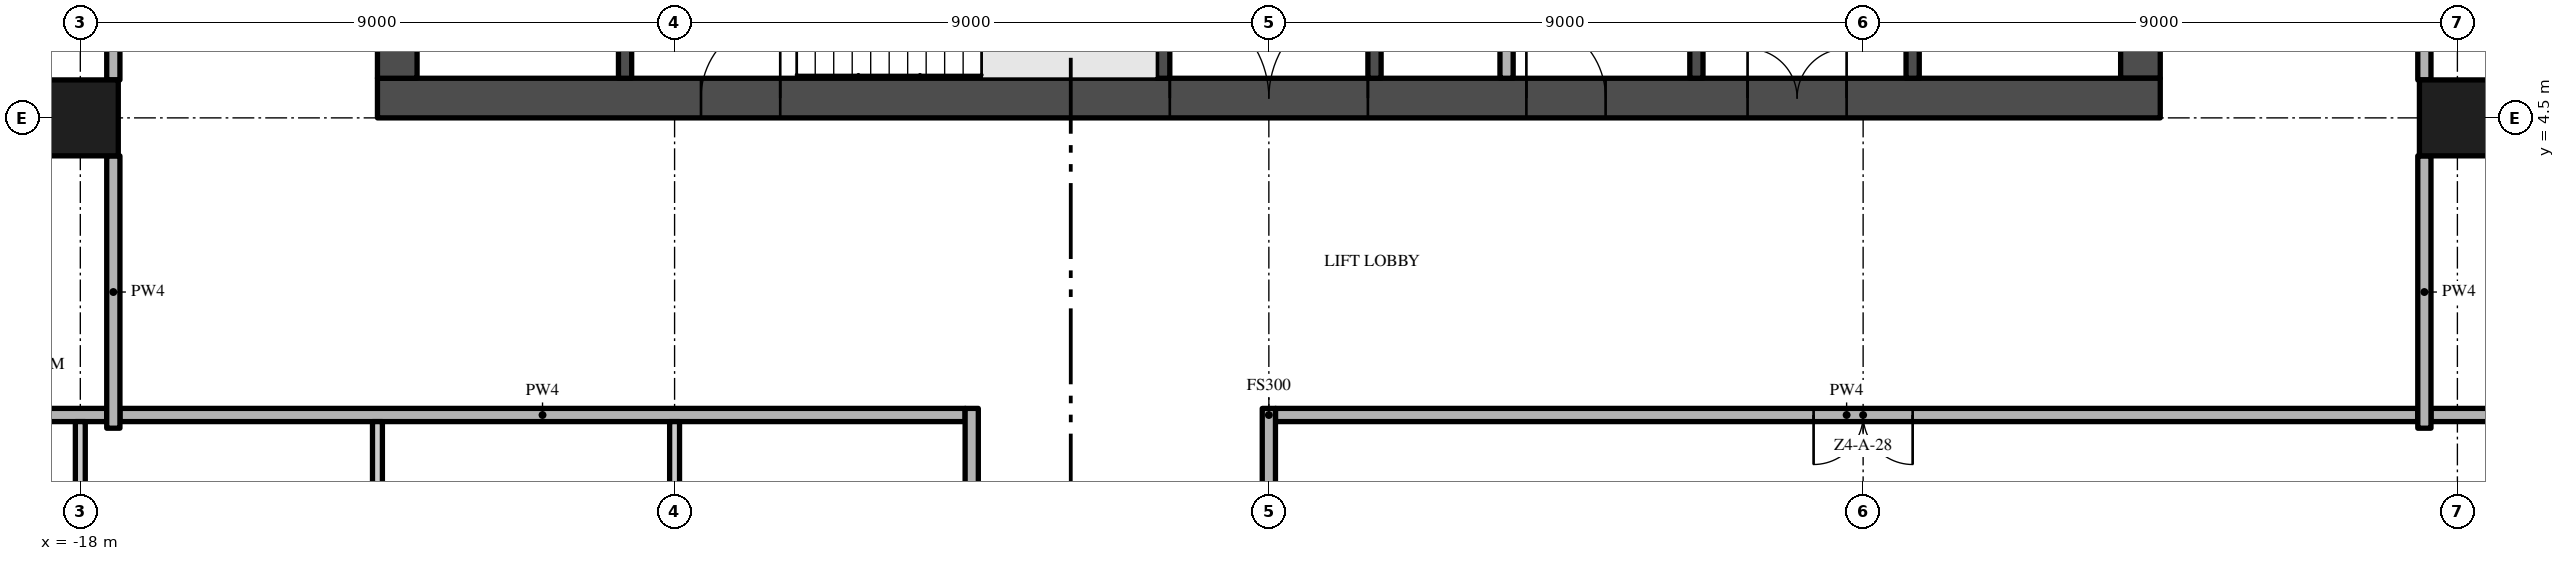
"""IFC4 building model, lengths in metres.
Left out: names, types, materials, properties, quantities, classifications, styles, units other than length and angle.
Written with IfcOpenShell. Run it as: python <this file> out.ifc"""

import sys

from ifc_helpers import new_model, si_unit, direction, frame, frame_2d, origin, origin_2d, place, context, subcontext, project, spatial, rectangle, extrude, element, fill, save


model = new_model("IFC4")
c1 = context("Model", 3, precision=1e-05, world=origin(), true_north=direction((0.0, 1.0)))
c2 = subcontext(c1, "Body", "Model", "MODEL_VIEW")
j1 = project(units=[si_unit("LENGTHUNIT", "METRE"), si_unit("PLANEANGLEUNIT", "RADIAN")], contexts=[c1])
p1 = place(None, origin())
s1 = spatial("IfcSite", under=j1, at=p1, CompositionType="ELEMENT")
p2 = place(p1, origin())
s2 = spatial("IfcBuilding", under=s1, at=p2, CompositionType="ELEMENT")
p3 = place(p2, frame((0.0, 0.0, 188.2)))
s3 = spatial("IfcBuildingStorey", under=s2, at=p3, CompositionType="ELEMENT", Elevation=188.2)
p4 = place(p3, frame((-13.5, 4.8, -0.3), z_axis=(0.0, 0.0, 1.0), x_axis=(1.0, 0.0, 0.0)))
e1 = element("IfcWall", 1, at=p4, inside=s3, PredefinedType="SHEAR", context=c2, shape_type="SweptSolid", body=[
    extrude(rectangle(XDim=27.0, YDim=0.6, at=frame_2d((13.5, 0.0))), origin(), (0.0, 0.0, 1.0), 3.8),
])
p5 = place(p4, frame((12.0, 0.0, 0.3)))
e2 = element("IfcOpeningElement", 2, at=p5, cuts=e1, PredefinedType="OPENING", context=c2, shape_type="SweptSolid", body=[
    extrude(rectangle(XDim=3.0, YDim=2.4, at=frame_2d((1.5, 1.2))), frame((0.0, 0.31, 0.0), z_axis=(0.0, -1.0, 0.0), x_axis=(1.0, 0.0, 0.0)), (0.0, 0.0, 1.0), 0.62),
])
p6 = place(p4, frame((4.9, 0.0, 0.3)))
e3 = element("IfcOpeningElement", 3, at=p6, cuts=e1, PredefinedType="OPENING", context=c2, shape_type="SweptSolid", body=[
    extrude(rectangle(XDim=1.2, YDim=2.2, at=frame_2d((0.6, 1.1))), frame((0.0, 0.31, 0.0), z_axis=(0.0, -1.0, 0.0), x_axis=(1.0, 0.0, 0.0)), (0.0, 0.0, 1.0), 0.62),
])
p7 = place(p4, frame((20.75, 0.0, 0.3)))
e4 = element("IfcOpeningElement", 4, at=p7, cuts=e1, PredefinedType="OPENING", context=c2, shape_type="SweptSolid", body=[
    extrude(rectangle(XDim=1.5, YDim=2.2, at=frame_2d((0.75, 1.1))), frame((0.0, 0.31, 0.0), z_axis=(0.0, -1.0, 0.0), x_axis=(1.0, 0.0, 0.0)), (0.0, 0.0, 1.0), 0.62),
])
p8 = place(p4, frame((17.4, 0.0, 0.3)))
e5 = element("IfcOpeningElement", 5, at=p8, cuts=e1, PredefinedType="OPENING", context=c2, shape_type="SweptSolid", body=[
    extrude(rectangle(XDim=1.2, YDim=2.2, at=frame_2d((0.6, 1.1))), frame((0.0, 0.31, 0.0), z_axis=(0.0, -1.0, 0.0), x_axis=(1.0, 0.0, 0.0)), (0.0, 0.0, 1.0), 0.62),
])
p9 = place(p3, frame((13.2, 5.1, -0.3), z_axis=(0.0, 0.0, 1.0), x_axis=(0.0, 1.0, 0.0)))
e6 = element("IfcWall", 6, at=p9, inside=s3, PredefinedType="SHEAR", context=c2, shape_type="SweptSolid", body=[
    extrude(rectangle(XDim=16.8, YDim=0.6, at=frame_2d((8.4, 0.0))), origin(), (0.0, 0.0, 1.0), 3.8),
])
p10 = place(p9, frame((6.3, 0.0, 0.3)))
e7 = element("IfcOpeningElement", 7, at=p10, cuts=e6, PredefinedType="OPENING", context=c2, shape_type="SweptSolid", body=[
    extrude(rectangle(XDim=1.2, YDim=2.2, at=frame_2d((0.6, 1.1))), frame((0.0, 0.31, 0.0), z_axis=(0.0, -1.0, 0.0), x_axis=(1.0, 0.0, 0.0)), (0.0, 0.0, 1.0), 0.62),
])
p11 = place(p3, frame((-13.2, 21.9, -0.3), z_axis=(0.0, 0.0, 1.0), x_axis=(0.0, -1.0, 0.0)))
e8 = element("IfcWall", 8, at=p11, inside=s3, PredefinedType="SHEAR", context=c2, shape_type="SweptSolid", body=[
    extrude(rectangle(XDim=16.8, YDim=0.6, at=frame_2d((8.4, 0.0))), origin(), (0.0, 0.0, 1.0), 3.8),
])
p12 = place(p11, frame((9.3, 0.0, 0.3)))
e9 = element("IfcOpeningElement", 9, at=p12, cuts=e8, PredefinedType="OPENING", context=c2, shape_type="SweptSolid", body=[
    extrude(rectangle(XDim=1.2, YDim=2.2, at=frame_2d((0.6, 1.1))), frame((0.0, 0.31, 0.0), z_axis=(0.0, -1.0, 0.0), x_axis=(1.0, 0.0, 0.0)), (0.0, 0.0, 1.0), 0.62),
])
for number, where, z_axis, x_axis in (
    (10, (-18.0, 4.5, 0.0), (0.0, 0.0, 1.0), (1.0, 0.0, 0.0)),
    (11, (18.0, 4.5, 0.0), (0.0, 0.0, 1.0), (1.0, 0.0, 0.0)),
):
    element("IfcColumn", number, at=place(p3, frame(where, z_axis=z_axis, x_axis=x_axis)), inside=s3, PredefinedType="COLUMN", context=c2, shape_type="SweptSolid", body=[
        extrude(rectangle(XDim=1.15, YDim=1.15, at=origin_2d()), origin(), (0.0, 0.0, 1.0), 3.5),
    ])
for number, where, z_axis, x_axis in (
    (12, (-9.75, 5.1, 0.0), (0.0, 0.0, 1.0), (0.0, 1.0, 0.0)),
    (13, (-1.6, 5.1, 0.0), (0.0, 0.0, 1.0), (0.0, 1.0, 0.0)),
):
    element("IfcWall", number, at=place(p3, frame(where, z_axis=z_axis, x_axis=x_axis)), inside=s3, PredefinedType="SHEAR", context=c2, shape_type="SweptSolid", body=[
        extrude(rectangle(XDim=2.85, YDim=0.2, at=frame_2d((1.425, 0.0))), origin(), (0.0, 0.0, 1.0), 3.5),
    ])
p13 = place(p3, frame((1.6, 13.5, 0.0), z_axis=(0.0, 0.0, 1.0), x_axis=(0.0, -1.0, 0.0)))
e14 = element("IfcWall", 14, at=p13, inside=s3, PredefinedType="SHEAR", context=c2, shape_type="SweptSolid", body=[
    extrude(rectangle(XDim=8.4, YDim=0.2, at=frame_2d((4.2, 0.0))), origin(), (0.0, 0.0, 1.0), 3.5),
])
p14 = place(p13, frame((3.35, 0.0, 0.0)))
e15 = element("IfcOpeningElement", 15, at=p14, cuts=e14, PredefinedType="OPENING", context=c2, shape_type="SweptSolid", body=[
    extrude(rectangle(XDim=0.9, YDim=2.1, at=frame_2d((0.45, 1.05))), frame((0.0, 0.11, 0.0), z_axis=(0.0, -1.0, 0.0), x_axis=(1.0, 0.0, 0.0)), (0.0, 0.0, 1.0), 0.22),
])
p15 = place(p3, frame((3.6, 13.5, 0.0), z_axis=(0.0, 0.0, 1.0), x_axis=(0.0, -1.0, 0.0)))
e16 = element("IfcWall", 16, at=p15, inside=s3, PredefinedType="PARTITIONING", context=c2, shape_type="SweptSolid", body=[
    extrude(rectangle(XDim=8.4, YDim=0.2, at=frame_2d((4.2, 0.0))), origin(), (0.0, 0.0, 1.0), 3.5),
])
p16 = place(p15, frame((3.75, 0.0, 0.0)))
e17 = element("IfcOpeningElement", 17, at=p16, cuts=e16, PredefinedType="OPENING", context=c2, shape_type="SweptSolid", body=[
    extrude(rectangle(XDim=0.9, YDim=2.1, at=frame_2d((0.45, 1.05))), frame((0.0, 0.11, 0.0), z_axis=(0.0, -1.0, 0.0), x_axis=(1.0, 0.0, 0.0)), (0.0, 0.0, 1.0), 0.22),
])
p17 = place(p3, frame((6.475, 5.1, 0.0), z_axis=(0.0, 0.0, 1.0), x_axis=(0.0, 1.0, 0.0)))
e18 = element("IfcWall", 18, at=p17, inside=s3, PredefinedType="SHEAR", context=c2, shape_type="SweptSolid", body=[
    extrude(rectangle(XDim=7.0, YDim=0.2, at=frame_2d((3.5, 0.0))), origin(), (0.0, 0.0, 1.0), 3.5),
])
p18 = place(p3, frame((9.75, 5.1, 0.0), z_axis=(0.0, 0.0, 1.0), x_axis=(0.0, 1.0, 0.0)))
e19 = element("IfcWall", 19, at=p18, inside=s3, PredefinedType="SHEAR", context=c2, shape_type="SweptSolid", body=[
    extrude(rectangle(XDim=2.5, YDim=0.2, at=frame_2d((1.25, 0.0))), origin(), (0.0, 0.0, 1.0), 3.5),
])
p19 = place(p18, frame((0.85, 0.0, 0.0)))
e20 = element("IfcOpeningElement", 20, at=p19, cuts=e19, PredefinedType="OPENING", context=c2, shape_type="SweptSolid", body=[
    extrude(rectangle(XDim=1.1, YDim=2.1, at=frame_2d((0.55, 1.05))), frame((0.0, 0.11, 0.0), z_axis=(0.0, -1.0, 0.0), x_axis=(1.0, 0.0, 0.0)), (0.0, 0.0, 1.0), 0.22),
])
p20 = place(p3, frame((-17.4, 0.0, 0.0), z_axis=(0.0, 0.0, 1.0), x_axis=(1.0, 0.0, 0.0)))
e21 = element("IfcWall", 21, at=p20, inside=s3, PredefinedType="PARTITIONING", context=c2, shape_type="SweptSolid", body=[
    extrude(rectangle(XDim=12.8, YDim=0.2, at=frame_2d((6.4, 0.0))), origin(), (0.0, 0.0, 1.0), 3.5),
])
p21 = place(p3, frame((17.4, 0.0, 0.0), z_axis=(0.0, 0.0, 1.0), x_axis=(-1.0, 0.0, 0.0)))
e22 = element("IfcWall", 22, at=p21, inside=s3, PredefinedType="PARTITIONING", context=c2, shape_type="SweptSolid", body=[
    extrude(rectangle(XDim=17.3, YDim=0.2, at=frame_2d((8.65, 0.0))), origin(), (0.0, 0.0, 1.0), 3.5),
])
p22 = place(p21, frame((7.65, 0.0, 0.0)))
e23 = element("IfcOpeningElement", 23, at=p22, cuts=e22, PredefinedType="OPENING", context=c2, shape_type="SweptSolid", body=[
    extrude(rectangle(XDim=1.5, YDim=2.4, at=frame_2d((0.75, 1.2))), frame((0.0, 0.11, 0.0), z_axis=(0.0, -1.0, 0.0), x_axis=(1.0, 0.0, 0.0)), (0.0, 0.0, 1.0), 0.22),
])
for number, where, z_axis, x_axis in (
    (24, (-26.7, 0.0, 0.0), (0.0, 0.0, 1.0), (1.0, 0.0, 0.0)),
    (25, (17.6, 0.0, 0.0), (0.0, 0.0, 1.0), (1.0, 0.0, 0.0)),
):
    element("IfcWall", number, at=place(p3, frame(where, z_axis=z_axis, x_axis=x_axis)), inside=s3, PredefinedType="PARTITIONING", context=c2, shape_type="SweptSolid", body=[
        extrude(rectangle(XDim=9.1, YDim=0.2, at=frame_2d((4.55, 0.0))), origin(), (0.0, 0.0, 1.0), 3.5),
    ])
p23 = place(p3, frame((-18.0, -3.925, 0.0), z_axis=(0.0, 0.0, 1.0), x_axis=(0.0, 1.0, 0.0)))
e26 = element("IfcWall", 26, at=p23, inside=s3, PredefinedType="PARTITIONING", context=c2, shape_type="SweptSolid", body=[
    extrude(rectangle(XDim=3.825, YDim=0.15, at=frame_2d((1.913, 0.0))), origin(), (0.0, 0.0, 1.0), 3.5),
])
p24 = place(p23, frame((0.15, 0.0, 0.0)))
e27 = element("IfcOpeningElement", 27, at=p24, cuts=e26, PredefinedType="OPENING", context=c2, shape_type="SweptSolid", body=[
    extrude(rectangle(XDim=1.0, YDim=2.4, at=frame_2d((0.5, 1.2))), frame((0.0, 0.085, 0.0), z_axis=(0.0, -1.0, 0.0), x_axis=(1.0, 0.0, 0.0)), (0.0, 0.0, 1.0), 0.17),
])
p25 = place(p3, frame((-17.5, -0.2, 0.0), z_axis=(0.0, 0.0, 1.0), x_axis=(0.0, 1.0, 0.0)))
e28 = element("IfcWall", 28, at=p25, inside=s3, PredefinedType="PARTITIONING", context=c2, shape_type="SweptSolid", body=[
    extrude(rectangle(XDim=4.125, YDim=0.2, at=frame_2d((2.062, 0.0))), origin(), (0.0, 0.0, 1.0), 3.5),
])
p26 = place(p3, frame((-17.5, 5.075, 0.0), z_axis=(0.0, 0.0, 1.0), x_axis=(0.0, 1.0, 0.0)))
e29 = element("IfcWall", 29, at=p26, inside=s3, PredefinedType="PARTITIONING", context=c2, shape_type="SweptSolid", body=[
    extrude(rectangle(XDim=7.85, YDim=0.2, at=frame_2d((3.925, 0.0))), origin(), (0.0, 0.0, 1.0), 3.5),
])
p27 = place(p26, frame((1.05, 0.0, 0.0)))
e30 = element("IfcOpeningElement", 30, at=p27, cuts=e29, PredefinedType="OPENING", context=c2, shape_type="SweptSolid", body=[
    extrude(rectangle(XDim=1.2, YDim=2.4, at=frame_2d((0.6, 1.2))), frame((0.0, 0.11, 0.0), z_axis=(0.0, -1.0, 0.0), x_axis=(1.0, 0.0, 0.0)), (0.0, 0.0, 1.0), 0.22),
])
p28 = place(p3, frame((-13.5, -11.325, 0.0), z_axis=(0.0, 0.0, 1.0), x_axis=(0.0, 1.0, 0.0)))
e31 = element("IfcWall", 31, at=p28, inside=s3, PredefinedType="PARTITIONING", context=c2, shape_type="SweptSolid", body=[
    extrude(rectangle(XDim=11.225, YDim=0.15, at=frame_2d((5.612, 0.0))), origin(), (0.0, 0.0, 1.0), 3.5),
])
p29 = place(p3, frame((-9.0, -3.925, 0.0), z_axis=(0.0, 0.0, 1.0), x_axis=(0.0, 1.0, 0.0)))
e32 = element("IfcWall", 32, at=p29, inside=s3, PredefinedType="PARTITIONING", context=c2, shape_type="SweptSolid", body=[
    extrude(rectangle(XDim=3.825, YDim=0.15, at=frame_2d((1.913, 0.0))), origin(), (0.0, 0.0, 1.0), 3.5),
])
p30 = place(p29, frame((2.025, 0.0, 0.0)))
e33 = element("IfcOpeningElement", 33, at=p30, cuts=e32, PredefinedType="OPENING", context=c2, shape_type="SweptSolid", body=[
    extrude(rectangle(XDim=0.8, YDim=2.0, at=frame_2d((0.4, 1.0))), frame((0.0, 0.085, 0.0), z_axis=(0.0, -1.0, 0.0), x_axis=(1.0, 0.0, 0.0)), (0.0, 0.0, 1.0), 0.17),
])
p31 = place(p3, frame((-4.5, -22.2, 0.0), z_axis=(0.0, 0.0, 1.0), x_axis=(0.0, 1.0, 0.0)))
e34 = element("IfcWall", 34, at=p31, inside=s3, PredefinedType="PARTITIONING", context=c2, shape_type="SweptSolid", body=[
    extrude(rectangle(XDim=22.3, YDim=0.2, at=frame_2d((11.15, 0.0))), origin(), (0.0, 0.0, 1.0), 3.5),
])
p32 = place(p31, frame((10.2, 0.0, 0.0)))
e35 = element("IfcOpeningElement", 35, at=p32, cuts=e34, PredefinedType="OPENING", context=c2, shape_type="SweptSolid", body=[
    extrude(rectangle(XDim=1.5, YDim=2.4, at=frame_2d((0.75, 1.2))), frame((0.0, 0.11, 0.0), z_axis=(0.0, -1.0, 0.0), x_axis=(1.0, 0.0, 0.0)), (0.0, 0.0, 1.0), 0.22),
])
p33 = place(p3, frame((0.0, -3.925, 0.0), z_axis=(0.0, 0.0, 1.0), x_axis=(0.0, 1.0, 0.0)))
e36 = element("IfcWall", 36, at=p33, inside=s3, PredefinedType="PARTITIONING", context=c2, shape_type="SweptSolid", body=[
    extrude(rectangle(XDim=4.025, YDim=0.2, at=frame_2d((2.013, 0.0))), origin(), (0.0, 0.0, 1.0), 3.5),
])
p34 = place(p3, frame((17.5, -0.2, 0.0), z_axis=(0.0, 0.0, 1.0), x_axis=(0.0, 1.0, 0.0)))
e37 = element("IfcWall", 37, at=p34, inside=s3, PredefinedType="PARTITIONING", context=c2, shape_type="SweptSolid", body=[
    extrude(rectangle(XDim=4.125, YDim=0.2, at=frame_2d((2.062, 0.0))), origin(), (0.0, 0.0, 1.0), 3.5),
])
p35 = place(p3, frame((17.5, 5.075, 0.0), z_axis=(0.0, 0.0, 1.0), x_axis=(0.0, 1.0, 0.0)))
e38 = element("IfcWall", 38, at=p35, inside=s3, PredefinedType="PARTITIONING", context=c2, shape_type="SweptSolid", body=[
    extrude(rectangle(XDim=7.85, YDim=0.2, at=frame_2d((3.925, 0.0))), origin(), (0.0, 0.0, 1.0), 3.5),
])
p36 = place(p5, frame((3.0, 0.0, 0.0), z_axis=(0.0, 0.0, 1.0), x_axis=(-1.0, 0.0, 0.0)))
e39 = element("IfcDoor", 39, at=p36, inside=s3, OperationType="DOUBLE_DOOR_SINGLE_SWING", PredefinedType="DOOR", context=c2, shape_type="SweptSolid", body=[
    extrude(rectangle(XDim=3.0, YDim=2.4, at=frame_2d((1.5, 1.2))), frame((0.0, 0.025, 0.0), z_axis=(0.0, -1.0, 0.0), x_axis=(1.0, 0.0, 0.0)), (0.0, 0.0, 1.0), 0.05),
])
fill(e2, e39)
p37 = place(p6, frame((1.2, 0.0, 0.0), z_axis=(0.0, 0.0, 1.0), x_axis=(-1.0, 0.0, 0.0)))
e40 = element("IfcDoor", 40, at=p37, inside=s3, OperationType="SINGLE_SWING_LEFT", PredefinedType="DOOR", context=c2, shape_type="SweptSolid", body=[
    extrude(rectangle(XDim=1.2, YDim=2.2, at=frame_2d((0.6, 1.1))), frame((0.0, 0.025, 0.0), z_axis=(0.0, -1.0, 0.0), x_axis=(1.0, 0.0, 0.0)), (0.0, 0.0, 1.0), 0.05),
])
fill(e3, e40)
p38 = place(p7, frame((1.5, 0.0, 0.0), z_axis=(0.0, 0.0, 1.0), x_axis=(-1.0, 0.0, 0.0)))
e41 = element("IfcDoor", 41, at=p38, inside=s3, OperationType="DOUBLE_DOOR_SINGLE_SWING", PredefinedType="DOOR", context=c2, shape_type="SweptSolid", body=[
    extrude(rectangle(XDim=1.5, YDim=2.2, at=frame_2d((0.75, 1.1))), frame((0.0, 0.025, 0.0), z_axis=(0.0, -1.0, 0.0), x_axis=(1.0, 0.0, 0.0)), (0.0, 0.0, 1.0), 0.05),
])
fill(e4, e41)
p39 = place(p8, frame((1.2, 0.0, 0.0), z_axis=(0.0, 0.0, 1.0), x_axis=(-1.0, 0.0, 0.0)))
e42 = element("IfcDoor", 42, at=p39, inside=s3, OperationType="SINGLE_SWING_RIGHT", PredefinedType="DOOR", context=c2, shape_type="SweptSolid", body=[
    extrude(rectangle(XDim=1.2, YDim=2.2, at=frame_2d((0.6, 1.1))), frame((0.0, 0.025, 0.0), z_axis=(0.0, -1.0, 0.0), x_axis=(1.0, 0.0, 0.0)), (0.0, 0.0, 1.0), 0.05),
])
fill(e5, e42)
p40 = place(p22, origin())
e43 = element("IfcDoor", 43, at=p40, inside=s3, OperationType="DOUBLE_DOOR_SINGLE_SWING", PredefinedType="DOOR", context=c2, shape_type="SweptSolid", body=[
    extrude(rectangle(XDim=1.5, YDim=2.4, at=frame_2d((0.75, 1.2))), frame((0.0, 0.025, 0.0), z_axis=(0.0, -1.0, 0.0), x_axis=(1.0, 0.0, 0.0)), (0.0, 0.0, 1.0), 0.05),
])
fill(e23, e43)
save(model, sys.argv[1])
